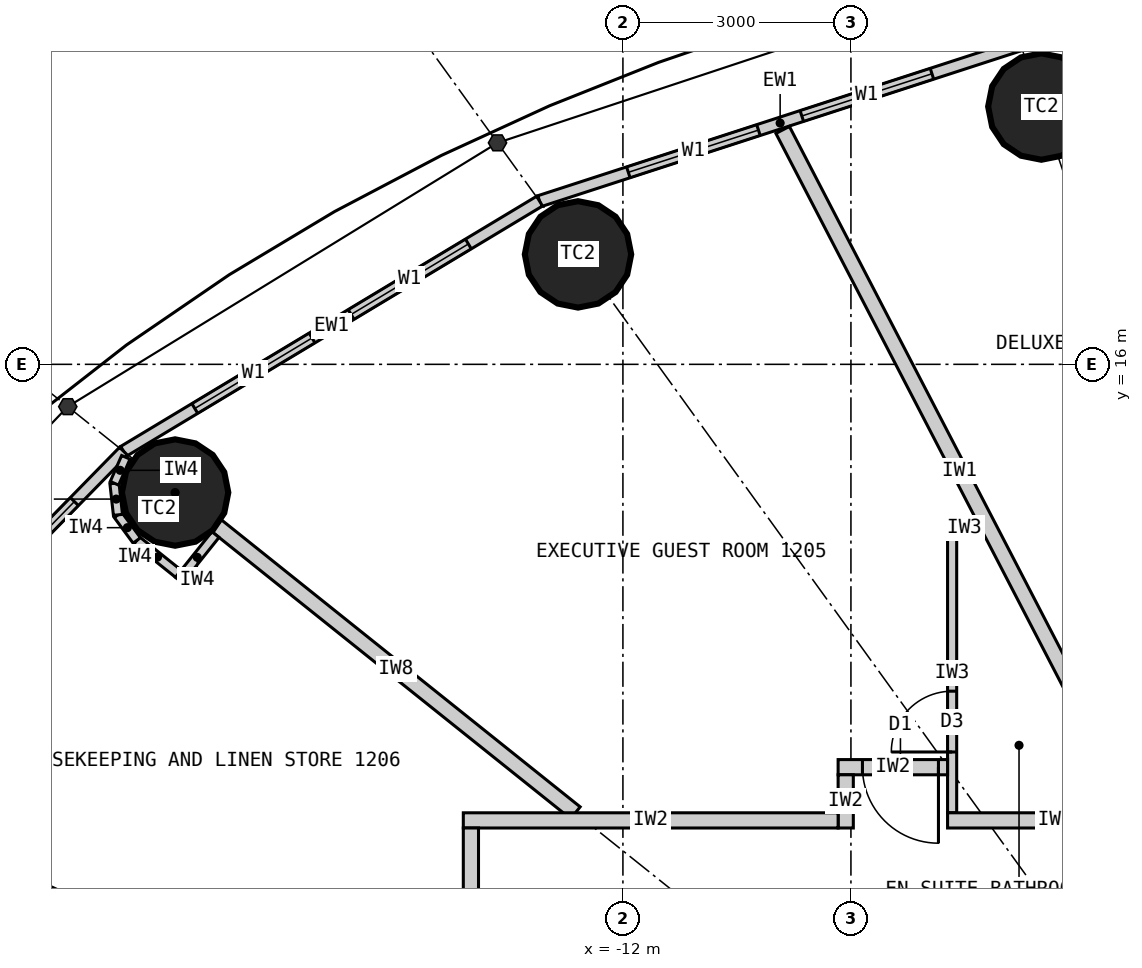
"""IFC4 building model, lengths in metres.
Left out: names, types, materials, properties, quantities, classifications, styles, units other than length and angle.
Written with IfcOpenShell. Run it as: python <this file> out.ifc"""

import sys

from ifc_helpers import new_model, si_unit, direction, frame, frame_2d, origin, origin_2d, place, context, subcontext, project, spatial, rectangle, circle, extrude, element, fill, save


model = new_model("IFC4")
c1 = context("Model", 3, precision=1e-05, world=origin(), true_north=direction((0.0, 1.0)))
c2 = subcontext(c1, "Body", "Model", "MODEL_VIEW")
j1 = project(units=[si_unit("LENGTHUNIT", "METRE"), si_unit("PLANEANGLEUNIT", "RADIAN")], contexts=[c1])
p1 = place(None, origin())
s1 = spatial("IfcSite", under=j1, at=p1, CompositionType="ELEMENT")
p2 = place(p1, origin())
s2 = spatial("IfcBuilding", under=s1, at=p2, CompositionType="ELEMENT")
p3 = place(p2, frame((0.0, 0.0, 54.0)))
s3 = spatial("IfcBuildingStorey", under=s2, at=p3, CompositionType="ELEMENT", Elevation=54.0)
for number, where, z_axis, x_axis in (
    (1, (-6.495, 19.391, 0.0), (0.0, 0.0, 1.0), (1.0, 0.0, 0.0)),
    (2, (-12.591, 17.447, 0.0), (0.0, 0.0, 1.0), (1.0, 0.0, 0.0)),
    (3, (-17.892, 14.313, 0.0), (0.0, 0.0, 1.0), (1.0, 0.0, 0.0)),
):
    element("IfcColumn", number, at=place(p3, frame(where, z_axis=z_axis, x_axis=x_axis)), inside=s3, PredefinedType="COLUMN", context=c2, shape_type="SweptSolid", body=[
        extrude(circle(Radius=0.7, at=origin_2d()), origin(), (0.0, 0.0, 1.0), 3.3),
    ])
p4 = place(p3, frame((-6.766, 20.202, 0.0), z_axis=(0.0, 0.0, 1.0), x_axis=(-0.951137534625, -0.308767534285, 0.0)))
e4 = element("IfcWall", 4, at=p4, inside=s3, PredefinedType="ELEMENTEDWALL", context=c2, shape_type="SweptSolid", body=[
    extrude(rectangle(XDim=6.655, YDim=0.15, at=frame_2d((3.328, 0.0))), origin(), (0.0, 0.0, 1.0), 3.12),
])
p5 = place(p4, frame((1.228, 0.0, 0.9)))
e5 = element("IfcOpeningElement", 5, at=p5, cuts=e4, PredefinedType="OPENING", context=c2, shape_type="SweptSolid", body=[
    extrude(rectangle(XDim=1.8, YDim=1.9, at=frame_2d((0.9, 0.95))), frame((0.0, 0.085, 0.0), z_axis=(0.0, -1.0, 0.0), x_axis=(1.0, 0.0, 0.0)), (0.0, 0.0, 1.0), 0.17),
])
p6 = place(p4, frame((3.628, 0.0, 0.9)))
e6 = element("IfcOpeningElement", 6, at=p6, cuts=e4, PredefinedType="OPENING", context=c2, shape_type="SweptSolid", body=[
    extrude(rectangle(XDim=1.8, YDim=1.9, at=frame_2d((0.9, 0.95))), frame((0.0, 0.085, 0.0), z_axis=(0.0, -1.0, 0.0), x_axis=(1.0, 0.0, 0.0)), (0.0, 0.0, 1.0), 0.17),
])
p7 = place(p3, frame((-13.096, 18.147, 0.0), z_axis=(0.0, 0.0, 1.0), x_axis=(-0.856983180864, -0.515344377787, 0.0)))
e7 = element("IfcWall", 7, at=p7, inside=s3, PredefinedType="ELEMENTEDWALL", context=c2, shape_type="SweptSolid", body=[
    extrude(rectangle(XDim=6.386, YDim=0.15, at=frame_2d((3.193, 0.0))), origin(), (0.0, 0.0, 1.0), 3.12),
])
p8 = place(p7, frame((1.093, 0.0, 0.9)))
e8 = element("IfcOpeningElement", 8, at=p8, cuts=e7, PredefinedType="OPENING", context=c2, shape_type="SweptSolid", body=[
    extrude(rectangle(XDim=1.8, YDim=1.9, at=frame_2d((0.9, 0.95))), frame((0.0, 0.085, 0.0), z_axis=(0.0, -1.0, 0.0), x_axis=(1.0, 0.0, 0.0)), (0.0, 0.0, 1.0), 0.17),
])
p9 = place(p7, frame((3.493, 0.0, 0.9)))
e9 = element("IfcOpeningElement", 9, at=p9, cuts=e7, PredefinedType="OPENING", context=c2, shape_type="SweptSolid", body=[
    extrude(rectangle(XDim=1.8, YDim=1.9, at=frame_2d((0.9, 0.95))), frame((0.0, 0.085, 0.0), z_axis=(0.0, -1.0, 0.0), x_axis=(1.0, 0.0, 0.0)), (0.0, 0.0, 1.0), 0.17),
])
p10 = place(p3, frame((-18.57, 14.856, 0.0), z_axis=(0.0, 0.0, 1.0), x_axis=(-0.699602905915, -0.714531856557, 0.0)))
e10 = element("IfcWall", 10, at=p10, inside=s3, PredefinedType="ELEMENTEDWALL", context=c2, shape_type="SweptSolid", body=[
    extrude(rectangle(XDim=6.051, YDim=0.15, at=frame_2d((3.025, 0.0))), origin(), (0.0, 0.0, 1.0), 3.12),
])
p11 = place(p10, frame((0.926, 0.0, 0.9)))
e11 = element("IfcOpeningElement", 11, at=p11, cuts=e10, PredefinedType="OPENING", context=c2, shape_type="SweptSolid", body=[
    extrude(rectangle(XDim=1.8, YDim=1.9, at=frame_2d((0.9, 0.95))), frame((0.0, 0.085, 0.0), z_axis=(0.0, -1.0, 0.0), x_axis=(1.0, 0.0, 0.0)), (0.0, 0.0, 1.0), 0.17),
])
p12 = place(p10, frame((3.325, 0.0, 0.9)))
e12 = element("IfcOpeningElement", 12, at=p12, cuts=e10, PredefinedType="OPENING", context=c2, shape_type="SweptSolid", body=[
    extrude(rectangle(XDim=1.8, YDim=1.9, at=frame_2d((0.9, 0.95))), frame((0.0, 0.085, 0.0), z_axis=(0.0, -1.0, 0.0), x_axis=(1.0, 0.0, 0.0)), (0.0, 0.0, 1.0), 0.17),
])
p13 = place(p3, frame((-5.239, 10.1, 0.0), z_axis=(0.0, 0.0, 1.0), x_axis=(-0.460422783389, 0.887699758103, 0.0)))
e13 = element("IfcWall", 13, at=p13, inside=s3, PredefinedType="PARTITIONING", context=c2, shape_type="SweptSolid", body=[
    extrude(rectangle(XDim=10.12, YDim=0.2, at=frame_2d((5.06, 0.0))), origin(), (0.0, 0.0, 1.0), 3.12),
])
p14 = place(p3, frame((-12.625, 10.1, 0.0), z_axis=(0.0, 0.0, 1.0), x_axis=(-0.780892451574, 0.624665493744, 0.0)))
e14 = element("IfcWall", 14, at=p14, inside=s3, PredefinedType="PARTITIONING", context=c2, shape_type="SweptSolid", body=[
    extrude(rectangle(XDim=6.045, YDim=0.2, at=frame_2d((3.022, 0.0))), origin(), (0.0, 0.0, 1.0), 2.32),
])
p15 = place(p3, frame((-14.1, 6.512, 0.0), z_axis=(0.0, 0.0, 1.0), x_axis=(-0.907832871056, 0.419332181247, 0.0)))
e15 = element("IfcWall", 15, at=p15, inside=s3, PredefinedType="PARTITIONING", context=c2, shape_type="SweptSolid", body=[
    extrude(rectangle(XDim=8.023, YDim=0.2, at=frame_2d((4.011, 0.0))), origin(), (0.0, 0.0, 1.0), 2.32),
])
p16 = place(p3, frame((-7.284, 13.85, 0.0), z_axis=(0.0, 0.0, 1.0), x_axis=(-1.0, 0.0, 0.0)))
e16 = element("IfcWall", 16, at=p16, inside=s3, PredefinedType="PARTITIONING", context=c2, shape_type="SweptSolid", body=[
    extrude(rectangle(XDim=0.445, YDim=0.12, at=frame_2d((0.222, 0.0))), origin(), (0.0, 0.0, 1.0), 3.12),
])
p17 = place(p3, frame((-7.669, 10.1, 0.0), z_axis=(0.0, 0.0, 1.0), x_axis=(0.0, 1.0, 0.0)))
e17 = element("IfcWall", 17, at=p17, inside=s3, PredefinedType="PARTITIONING", context=c2, shape_type="SweptSolid", body=[
    extrude(rectangle(XDim=3.69, YDim=0.12, at=frame_2d((1.845, 0.0))), origin(), (0.0, 0.0, 1.0), 3.12),
])
p18 = place(p17, frame((0.8, 0.0, 0.0)))
e18 = element("IfcOpeningElement", 18, at=p18, cuts=e17, PredefinedType="OPENING", context=c2, shape_type="SweptSolid", body=[
    extrude(rectangle(XDim=0.8, YDim=2.1, at=frame_2d((0.4, 1.05))), frame((0.0, 0.07, 0.0), z_axis=(0.0, -1.0, 0.0), x_axis=(1.0, 0.0, 0.0)), (0.0, 0.0, 1.0), 0.14),
])
p19 = place(p3, frame((-9.169, 10.7, 0.0), z_axis=(0.0, 0.0, 1.0), x_axis=(1.0, 0.0, 0.0)))
e19 = element("IfcWall", 19, at=p19, inside=s3, PredefinedType="PARTITIONING", context=c2, shape_type="SweptSolid", body=[
    extrude(rectangle(XDim=1.44, YDim=0.2, at=frame_2d((0.72, 0.0))), origin(), (0.0, 0.0, 1.0), 3.12),
])
p20 = place(p19, frame((0.32, 0.0, 0.0)))
e20 = element("IfcOpeningElement", 20, at=p20, cuts=e19, PredefinedType="OPENING", context=c2, shape_type="SweptSolid", body=[
    extrude(rectangle(XDim=1.0, YDim=2.2, at=frame_2d((0.5, 1.1))), frame((0.0, 0.11, 0.0), z_axis=(0.0, -1.0, 0.0), x_axis=(1.0, 0.0, 0.0)), (0.0, 0.0, 1.0), 0.22),
])
p21 = place(p3, frame((-9.069, 9.9, 0.0), z_axis=(0.0, 0.0, 1.0), x_axis=(0.0, 1.0, 0.0)))
e21 = element("IfcWall", 21, at=p21, inside=s3, PredefinedType="PARTITIONING", context=c2, shape_type="SweptSolid", body=[
    extrude(rectangle(XDim=0.7, YDim=0.2, at=frame_2d((0.35, 0.0))), origin(), (0.0, 0.0, 1.0), 3.12),
])
p22 = place(p3, frame((-14.1, 10.0, 0.0), z_axis=(0.0, 0.0, 1.0), x_axis=(1.0, 0.0, 0.0)))
e22 = element("IfcWall", 22, at=p22, inside=s3, PredefinedType="PARTITIONING", context=c2, shape_type="SweptSolid", body=[
    extrude(rectangle(XDim=4.931, YDim=0.2, at=frame_2d((2.466, 0.0))), origin(), (0.0, 0.0, 1.0), 3.12),
])
p23 = place(p3, frame((-7.729, 10.0, 0.0), z_axis=(0.0, 0.0, 1.0), x_axis=(1.0, 0.0, 0.0)))
e23 = element("IfcWall", 23, at=p23, inside=s3, PredefinedType="PARTITIONING", context=c2, shape_type="SweptSolid", body=[
    extrude(rectangle(XDim=2.833, YDim=0.2, at=frame_2d((1.417, 0.0))), origin(), (0.0, 0.0, 1.0), 3.12),
])
p24 = place(p3, frame((-14.0, 9.9, 0.0), z_axis=(0.0, 0.0, 1.0), x_axis=(0.0, -1.0, 0.0)))
e24 = element("IfcWall", 24, at=p24, inside=s3, PredefinedType="PARTITIONING", context=c2, shape_type="SweptSolid", body=[
    extrude(rectangle(XDim=5.127, YDim=0.2, at=frame_2d((2.564, 0.0))), origin(), (0.0, 0.0, 1.0), 3.12),
])
p25 = place(p24, frame((1.792, 0.0, 0.0)))
e25 = element("IfcOpeningElement", 25, at=p25, cuts=e24, PredefinedType="OPENING", context=c2, shape_type="SweptSolid", body=[
    extrude(rectangle(XDim=1.0, YDim=2.2, at=frame_2d((0.5, 1.1))), frame((0.0, 0.11, 0.0), z_axis=(0.0, -1.0, 0.0), x_axis=(1.0, 0.0, 0.0)), (0.0, 0.0, 1.0), 0.22),
])
p26 = place(p3, frame((-17.361, 13.76, 0.0), z_axis=(0.0, 0.0, 1.0), x_axis=(-0.624501042889, -0.781023973659, 0.0)))
e26 = element("IfcWall", 26, at=p26, inside=s3, PredefinedType="PARTITIONING", context=c2, shape_type="SweptSolid", body=[
    extrude(rectangle(XDim=0.767, YDim=0.12, at=frame_2d((0.384, 0.0))), origin(), (0.0, 0.0, 1.0), 3.12),
])
p27 = place(p3, frame((-17.85, 13.246, 0.0), z_axis=(0.0, 0.0, 1.0), x_axis=(-0.780902834923, 0.62465251333, 0.0)))
e27 = element("IfcWall", 27, at=p27, inside=s3, PredefinedType="PARTITIONING", context=c2, shape_type="SweptSolid", body=[
    extrude(rectangle(XDim=0.7, YDim=0.12, at=frame_2d((0.35, 0.0))), origin(), (0.0, 0.0, 1.0), 3.12),
])
for number, where, z_axis, x_axis in (
    (28, (-18.396, 13.683, 0.0), (0.0, 0.0, 1.0), (-0.592, 0.806, 0.0)),
    (29, (-18.644, 14.02, 0.0), (0.0, 0.0, 1.0), (-0.11, 0.994, 0.0)),
):
    element("IfcWall", number, at=place(p3, frame(where, z_axis=z_axis, x_axis=x_axis)), inside=s3, PredefinedType="PARTITIONING", context=c2, shape_type="SweptSolid", body=[
        extrude(rectangle(XDim=0.418, YDim=0.12, at=frame_2d((0.209, 0.0))), origin(), (0.0, 0.0, 1.0), 3.12),
    ])
p28 = place(p3, frame((-18.69, 14.435, 0.0), z_axis=(0.0, 0.0, 1.0), x_axis=(0.401093412634, 0.91603715773, 0.0)))
e30 = element("IfcWall", 30, at=p28, inside=s3, PredefinedType="PARTITIONING", context=c2, shape_type="SweptSolid", body=[
    extrude(rectangle(XDim=0.373, YDim=0.12, at=frame_2d((0.187, 0.0))), origin(), (0.0, 0.0, 1.0), 3.12),
])
p29 = place(p5, origin())
e31 = element("IfcWindow", 31, at=p29, inside=s3, PartitioningType="SINGLE_PANEL", PredefinedType="WINDOW", context=c2, shape_type="SweptSolid", body=[
    extrude(rectangle(XDim=1.8, YDim=1.9, at=frame_2d((0.9, 0.95))), frame((0.0, 0.03, 0.0), z_axis=(0.0, -1.0, 0.0), x_axis=(1.0, 0.0, 0.0)), (0.0, 0.0, 1.0), 0.06),
])
fill(e5, e31)
p30 = place(p6, origin())
e32 = element("IfcWindow", 32, at=p30, inside=s3, PartitioningType="SINGLE_PANEL", PredefinedType="WINDOW", context=c2, shape_type="SweptSolid", body=[
    extrude(rectangle(XDim=1.8, YDim=1.9, at=frame_2d((0.9, 0.95))), frame((0.0, 0.03, 0.0), z_axis=(0.0, -1.0, 0.0), x_axis=(1.0, 0.0, 0.0)), (0.0, 0.0, 1.0), 0.06),
])
fill(e6, e32)
p31 = place(p8, origin())
e33 = element("IfcWindow", 33, at=p31, inside=s3, PartitioningType="SINGLE_PANEL", PredefinedType="WINDOW", context=c2, shape_type="SweptSolid", body=[
    extrude(rectangle(XDim=1.8, YDim=1.9, at=frame_2d((0.9, 0.95))), frame((0.0, 0.03, 0.0), z_axis=(0.0, -1.0, 0.0), x_axis=(1.0, 0.0, 0.0)), (0.0, 0.0, 1.0), 0.06),
])
fill(e8, e33)
p32 = place(p9, origin())
e34 = element("IfcWindow", 34, at=p32, inside=s3, PartitioningType="SINGLE_PANEL", PredefinedType="WINDOW", context=c2, shape_type="SweptSolid", body=[
    extrude(rectangle(XDim=1.8, YDim=1.9, at=frame_2d((0.9, 0.95))), frame((0.0, 0.03, 0.0), z_axis=(0.0, -1.0, 0.0), x_axis=(1.0, 0.0, 0.0)), (0.0, 0.0, 1.0), 0.06),
])
fill(e9, e34)
p33 = place(p11, origin())
e35 = element("IfcWindow", 35, at=p33, inside=s3, PartitioningType="SINGLE_PANEL", PredefinedType="WINDOW", context=c2, shape_type="SweptSolid", body=[
    extrude(rectangle(XDim=1.8, YDim=1.9, at=frame_2d((0.9, 0.95))), frame((0.0, 0.03, 0.0), z_axis=(0.0, -1.0, 0.0), x_axis=(1.0, 0.0, 0.0)), (0.0, 0.0, 1.0), 0.06),
])
fill(e11, e35)
p34 = place(p18, origin())
e36 = element("IfcDoor", 36, at=p34, inside=s3, OperationType="SINGLE_SWING_LEFT", PredefinedType="DOOR", context=c2, shape_type="SweptSolid", body=[
    extrude(rectangle(XDim=0.8, YDim=2.1, at=frame_2d((0.4, 1.05))), frame((0.0, 0.025, 0.0), z_axis=(0.0, -1.0, 0.0), x_axis=(1.0, 0.0, 0.0)), (0.0, 0.0, 1.0), 0.05),
])
fill(e18, e36)
p35 = place(p20, origin())
e37 = element("IfcDoor", 37, at=p35, inside=s3, OperationType="SINGLE_SWING_RIGHT", PredefinedType="DOOR", context=c2, shape_type="SweptSolid", body=[
    extrude(rectangle(XDim=1.0, YDim=2.2, at=frame_2d((0.5, 1.1))), frame((0.0, 0.025, 0.0), z_axis=(0.0, -1.0, 0.0), x_axis=(1.0, 0.0, 0.0)), (0.0, 0.0, 1.0), 0.05),
])
fill(e20, e37)
save(model, sys.argv[1])
